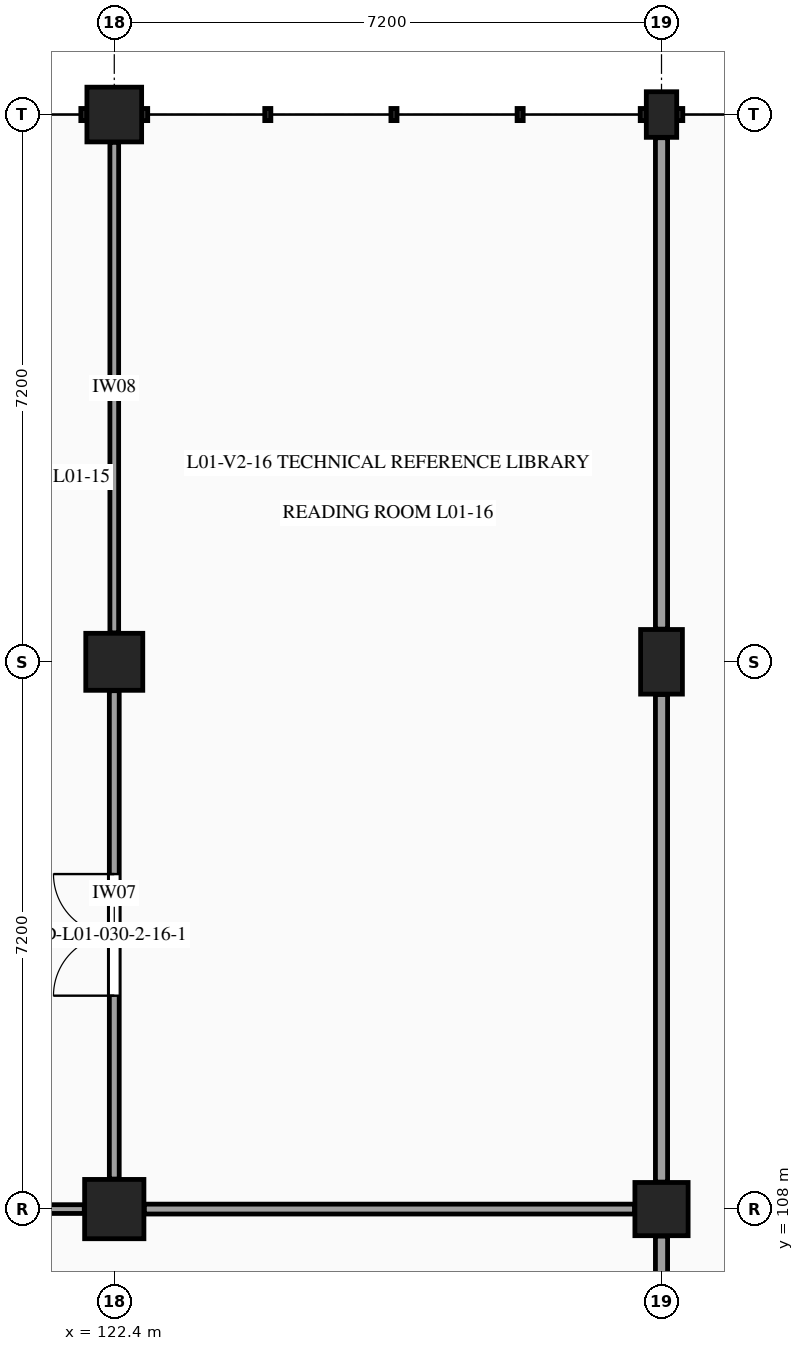
"""IFC4 building model, lengths in metres.
Left out: names, types, materials, properties, quantities, classifications, styles, units other than length and angle.
Written with IfcOpenShell. Run it as: python <this file> out.ifc"""

import sys

from ifc_helpers import new_model, si_unit, direction, frame, frame_2d, origin, origin_2d, place, context, subcontext, project, spatial, rectangle, extrude, element, fill, save


model = new_model("IFC4")
c1 = context("Model", 3, precision=1e-05, world=origin(), true_north=direction((0.0, 1.0)))
c2 = subcontext(c1, "Body", "Model", "MODEL_VIEW")
j1 = project(units=[si_unit("LENGTHUNIT", "METRE"), si_unit("PLANEANGLEUNIT", "RADIAN")], contexts=[c1])
p1 = place(None, origin())
s1 = spatial("IfcSite", under=j1, at=p1, CompositionType="ELEMENT")
p2 = place(p1, origin())
s2 = spatial("IfcBuilding", under=s1, at=p2, CompositionType="ELEMENT")
p3 = place(p2, frame((0.0, 0.0, 5.4)))
s3 = spatial("IfcBuildingStorey", under=s2, at=p3, CompositionType="ELEMENT", Elevation=5.4)
p4 = place(p3, frame((122.4, 108.0, 0.0), z_axis=(0.0, 0.0, 1.0), x_axis=(1.0, 0.0, 0.0)))
e1 = element("IfcColumn", 1, at=p4, inside=s3, PredefinedType="COLUMN", context=c2, shape_type="SweptSolid", body=[
    extrude(rectangle(XDim=0.78, YDim=0.78, at=origin_2d()), origin(), (0.0, 0.0, 1.0), 4.5),
])
p5 = place(p3, frame((122.4, 115.2, 0.0), z_axis=(0.0, 0.0, 1.0), x_axis=(1.0, 0.0, 0.0)))
e2 = element("IfcColumn", 2, at=p5, inside=s3, PredefinedType="COLUMN", context=c2, shape_type="SweptSolid", body=[
    extrude(rectangle(XDim=0.75, YDim=0.75, at=origin_2d()), origin(), (0.0, 0.0, 1.0), 4.5),
])
p6 = place(p3, frame((122.4, 122.4, 0.0), z_axis=(0.0, 0.0, 1.0), x_axis=(1.0, 0.0, 0.0)))
e3 = element("IfcColumn", 3, at=p6, inside=s3, PredefinedType="COLUMN", context=c2, shape_type="SweptSolid", body=[
    extrude(rectangle(XDim=0.72, YDim=0.72, at=origin_2d()), origin(), (0.0, 0.0, 1.0), 4.5),
])
p7 = place(p3, frame((129.6, 108.0, 0.0), z_axis=(0.0, 0.0, 1.0), x_axis=(1.0, 0.0, 0.0)))
e4 = element("IfcColumn", 4, at=p7, inside=s3, PredefinedType="COLUMN", context=c2, shape_type="SweptSolid", body=[
    extrude(rectangle(XDim=0.7, YDim=0.7, at=origin_2d()), origin(), (0.0, 0.0, 1.0), 4.5),
])
p8 = place(p3, frame((129.6, 115.2, 0.0), z_axis=(0.0, 0.0, 1.0), x_axis=(1.0, 0.0, 0.0)))
e5 = element("IfcColumn", 5, at=p8, inside=s3, PredefinedType="COLUMN", context=c2, shape_type="SweptSolid", body=[
    extrude(rectangle(XDim=0.55, YDim=0.85, at=origin_2d()), origin(), (0.0, 0.0, 1.0), 4.5),
])
p9 = place(p3, frame((129.6, 122.4, 0.0), z_axis=(0.0, 0.0, 1.0), x_axis=(1.0, 0.0, 0.0)))
e6 = element("IfcColumn", 6, at=p9, inside=s3, PredefinedType="PILASTER", context=c2, shape_type="SweptSolid", body=[
    extrude(rectangle(XDim=0.4, YDim=0.6, at=origin_2d()), origin(), (0.0, 0.0, 1.0), 4.5),
])
p10 = place(p3, frame((115.555, 108.0, 0.0), z_axis=(0.0, 0.0, 1.0), x_axis=(1.0, 0.0, 0.0)))
e7 = element("IfcWall", 7, at=p10, inside=s3, PredefinedType="PARTITIONING", context=c2, shape_type="SweptSolid", body=[
    extrude(rectangle(XDim=6.45, YDim=0.115, at=frame_2d((3.225, 0.0))), origin(), (0.0, 0.0, 1.0), 3.56),
])
p11 = place(p3, frame((122.4, 108.395, 0.0), z_axis=(0.0, 0.0, 1.0), x_axis=(0.0, 1.0, 0.0)))
e8 = element("IfcWall", 8, at=p11, inside=s3, PredefinedType="PARTITIONING", context=c2, shape_type="SweptSolid", body=[
    extrude(rectangle(XDim=6.425, YDim=0.13, at=frame_2d((3.212, 0.0))), origin(), (0.0, 0.0, 1.0), 3.525),
])
p12 = place(p11, frame((2.413, 0.0, 0.0)))
e9 = element("IfcOpeningElement", 9, at=p12, cuts=e8, PredefinedType="OPENING", context=c2, shape_type="SweptSolid", body=[
    extrude(rectangle(XDim=1.6, YDim=2.2, at=frame_2d((0.8, 1.1))), frame((0.0, 0.075, 0.0), z_axis=(0.0, -1.0, 0.0), x_axis=(1.0, 0.0, 0.0)), (0.0, 0.0, 1.0), 0.15),
])
p13 = place(p3, frame((122.4, 115.58, 0.0), z_axis=(0.0, 0.0, 1.0), x_axis=(0.0, 1.0, 0.0)))
e10 = element("IfcWall", 10, at=p13, inside=s3, PredefinedType="PARTITIONING", context=c2, shape_type="SweptSolid", body=[
    extrude(rectangle(XDim=6.455, YDim=0.115, at=frame_2d((3.228, 0.0))), origin(), (0.0, 0.0, 1.0), 3.52),
])
p14 = place(p3, frame((129.6, 101.165, 0.0), z_axis=(0.0, 0.0, 1.0), x_axis=(0.0, 1.0, 0.0)))
e11 = element("IfcWall", 11, at=p14, inside=s3, PredefinedType="PARTITIONING", context=c2, shape_type="SweptSolid", body=[
    extrude(rectangle(XDim=6.48, YDim=0.16, at=frame_2d((3.24, 0.0))), origin(), (0.0, 0.0, 1.0), 3.525),
])
p15 = place(p3, frame((122.795, 108.0, 0.0), z_axis=(0.0, 0.0, 1.0), x_axis=(1.0, 0.0, 0.0)))
e12 = element("IfcWall", 12, at=p15, inside=s3, PredefinedType="PARTITIONING", context=c2, shape_type="SweptSolid", body=[
    extrude(rectangle(XDim=6.45, YDim=0.13, at=frame_2d((3.225, 0.0))), origin(), (0.0, 0.0, 1.0), 3.57),
])
p16 = place(p3, frame((129.6, 108.355, 0.0), z_axis=(0.0, 0.0, 1.0), x_axis=(0.0, 1.0, 0.0)))
e13 = element("IfcWall", 13, at=p16, inside=s3, PredefinedType="PARTITIONING", context=c2, shape_type="SweptSolid", body=[
    extrude(rectangle(XDim=6.415, YDim=0.16, at=frame_2d((3.208, 0.0))), origin(), (0.0, 0.0, 1.0), 3.525),
])
p17 = place(p3, frame((129.6, 115.63, 0.0), z_axis=(0.0, 0.0, 1.0), x_axis=(0.0, 1.0, 0.0)))
e14 = element("IfcWall", 14, at=p17, inside=s3, PredefinedType="PARTITIONING", context=c2, shape_type="SweptSolid", body=[
    extrude(rectangle(XDim=6.465, YDim=0.16, at=frame_2d((3.232, 0.0))), origin(), (0.0, 0.0, 1.0), 3.52),
])
p18 = place(p12, origin())
e15 = element("IfcDoor", 15, at=p18, inside=s3, OperationType="DOUBLE_DOOR_SINGLE_SWING", PredefinedType="DOOR", context=c2, shape_type="SweptSolid", body=[
    extrude(rectangle(XDim=1.6, YDim=2.2, at=frame_2d((0.8, 1.1))), frame((0.0, 0.025, 0.0), z_axis=(0.0, -1.0, 0.0), x_axis=(1.0, 0.0, 0.0)), (0.0, 0.0, 1.0), 0.05),
])
fill(e9, e15)
save(model, sys.argv[1])
